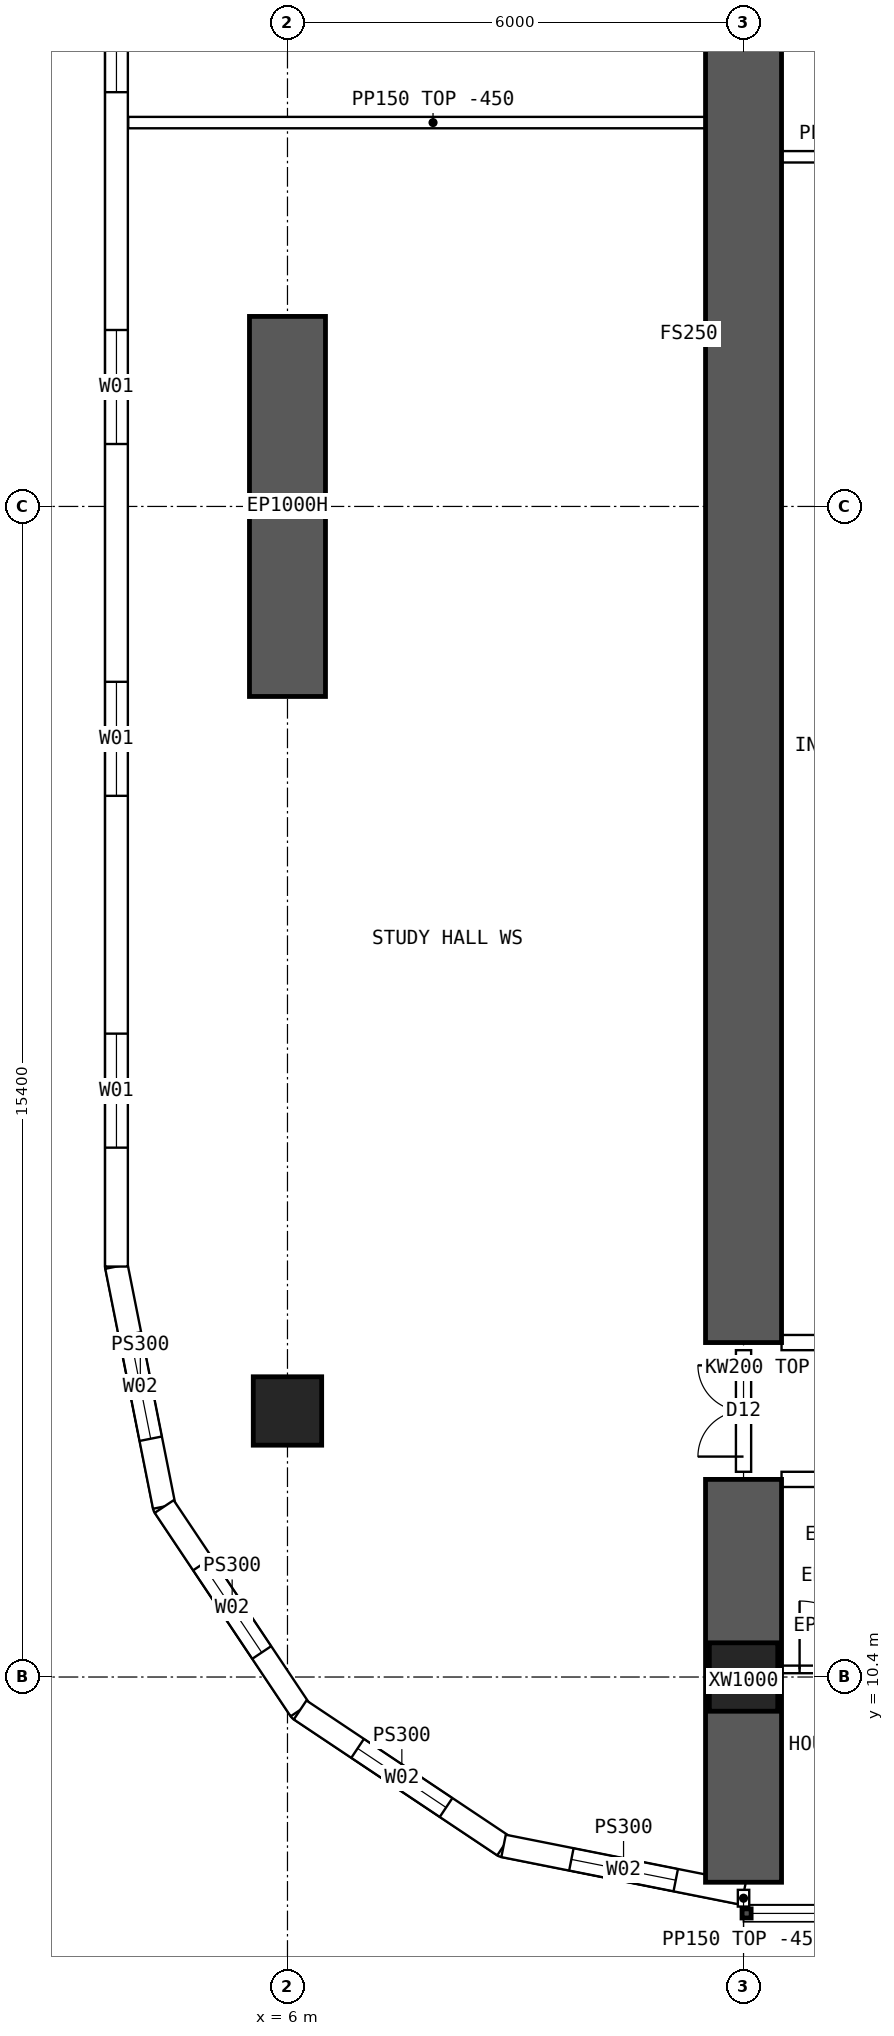
"""IFC4 building model, lengths in metres.
Left out: names, types, materials, properties, quantities, classifications, styles, units other than length and angle.
Written with IfcOpenShell. Run it as: python <this file> out.ifc"""

import sys

from ifc_helpers import new_model, si_unit, direction, frame, frame_2d, origin, origin_2d, place, context, subcontext, project, spatial, polyline, rectangle, hollow_rectangle, outline, extrude, element, fill, save


model = new_model("IFC4")
c1 = context("Model", 3, precision=1e-05, world=origin(), true_north=direction((0.0, 1.0)))
c2 = subcontext(c1, "Body", "Model", "MODEL_VIEW")
j1 = project(units=[si_unit("LENGTHUNIT", "METRE"), si_unit("PLANEANGLEUNIT", "RADIAN")], contexts=[c1])
p1 = place(None, origin())
s1 = spatial("IfcSite", under=j1, at=p1, CompositionType="ELEMENT")
p2 = place(p1, origin())
s2 = spatial("IfcBuilding", under=s1, at=p2, CompositionType="ELEMENT")
p3 = place(p2, frame((0.0, 0.0, 20.2)))
s3 = spatial("IfcBuildingStorey", under=s2, at=p3, CompositionType="ELEMENT", Elevation=20.2)
for number, where, z_axis, x_axis in (
    (1, (12.0, 10.4, 0.0), (0.0, 0.0, 1.0), (1.0, 0.0, 0.0)),
    (2, (6.0, 13.9, 0.0), (0.0, 0.0, 1.0), (1.0, 0.0, 0.0)),
):
    element("IfcColumn", number, at=place(p3, frame(where, z_axis=z_axis, x_axis=x_axis)), inside=s3, PredefinedType="COLUMN", context=c2, shape_type="SweptSolid", body=[
        extrude(hollow_rectangle(XDim=0.9, YDim=0.9, WallThickness=0.09, at=origin_2d()), origin(), (0.0, 0.0, 1.0), 3.75),
    ])
p4 = place(p3, frame((6.0, 23.3, 0.0), z_axis=(0.0, 0.0, 1.0), x_axis=(0.0, 1.0, 0.0)))
e3 = element("IfcWall", 3, at=p4, inside=s3, PredefinedType="SHEAR", context=c2, shape_type="SweptSolid", body=[
    extrude(rectangle(XDim=5.0, YDim=1.0, at=frame_2d((2.5, 0.0))), origin(), (0.0, 0.0, 1.0), 3.75),
])
p5 = place(p3, frame((12.0, 7.7, 0.0), z_axis=(0.0, 0.0, 1.0), x_axis=(0.0, 1.0, 0.0)))
e4 = element("IfcWall", 4, at=p5, inside=s3, PredefinedType="SHEAR", context=c2, shape_type="SweptSolid", body=[
    extrude(rectangle(XDim=5.3, YDim=1.0, at=frame_2d((2.65, 0.0))), origin(), (0.0, 0.0, 1.0), 3.75),
])
p6 = place(p3, frame((12.0, 14.8, 0.0), z_axis=(0.0, 0.0, 1.0), x_axis=(0.0, 1.0, 0.0)))
e5 = element("IfcWall", 5, at=p6, inside=s3, PredefinedType="SHEAR", context=c2, shape_type="SweptSolid", body=[
    extrude(rectangle(XDim=34.4, YDim=1.0, at=frame_2d((17.2, 0.0))), origin(), (0.0, 0.0, 1.0), 3.75),
])
p7 = place(p3, frame((3.75, 48.2, 0.0), z_axis=(0.0, 0.0, 1.0), x_axis=(0.0, -1.0, 0.0)))
e6 = element("IfcWall", 6, at=p7, inside=s3, PredefinedType="SOLIDWALL", context=c2, shape_type="SweptSolid", body=[
    extrude(outline(polyline([(-0.015, -0.15), (32.415, -0.15), (32.385, 0.15), (0.015, 0.15), (-0.015, -0.15)])), origin(), (0.0, 0.0, 1.0), 3.3),
])
p8 = place(p7, frame((1.564, 0.0, 0.9)))
e7 = element("IfcOpeningElement", 7, at=p8, cuts=e6, PredefinedType="OPENING", context=c2, shape_type="SweptSolid", body=[
    extrude(rectangle(XDim=1.5, YDim=2.0, at=frame_2d((0.75, 1.0))), frame((0.0, 0.16, 0.0), z_axis=(0.0, -1.0, 0.0), x_axis=(1.0, 0.0, 0.0)), (0.0, 0.0, 1.0), 0.32),
])
p9 = place(p7, frame((6.193, 0.0, 0.9)))
e8 = element("IfcOpeningElement", 8, at=p9, cuts=e6, PredefinedType="OPENING", context=c2, shape_type="SweptSolid", body=[
    extrude(rectangle(XDim=1.5, YDim=2.0, at=frame_2d((0.75, 1.0))), frame((0.0, 0.16, 0.0), z_axis=(0.0, -1.0, 0.0), x_axis=(1.0, 0.0, 0.0)), (0.0, 0.0, 1.0), 0.32),
])
p10 = place(p7, frame((10.822, 0.0, 0.9)))
e9 = element("IfcOpeningElement", 9, at=p10, cuts=e6, PredefinedType="OPENING", context=c2, shape_type="SweptSolid", body=[
    extrude(rectangle(XDim=1.5, YDim=2.0, at=frame_2d((0.75, 1.0))), frame((0.0, 0.16, 0.0), z_axis=(0.0, -1.0, 0.0), x_axis=(1.0, 0.0, 0.0)), (0.0, 0.0, 1.0), 0.32),
])
p11 = place(p7, frame((15.45, 0.0, 0.9)))
e10 = element("IfcOpeningElement", 10, at=p11, cuts=e6, PredefinedType="OPENING", context=c2, shape_type="SweptSolid", body=[
    extrude(rectangle(XDim=1.5, YDim=2.0, at=frame_2d((0.75, 1.0))), frame((0.0, 0.16, 0.0), z_axis=(0.0, -1.0, 0.0), x_axis=(1.0, 0.0, 0.0)), (0.0, 0.0, 1.0), 0.32),
])
p12 = place(p7, frame((20.079, 0.0, 0.9)))
e11 = element("IfcOpeningElement", 11, at=p12, cuts=e6, PredefinedType="OPENING", context=c2, shape_type="SweptSolid", body=[
    extrude(rectangle(XDim=1.5, YDim=2.0, at=frame_2d((0.75, 1.0))), frame((0.0, 0.16, 0.0), z_axis=(0.0, -1.0, 0.0), x_axis=(1.0, 0.0, 0.0)), (0.0, 0.0, 1.0), 0.32),
])
p13 = place(p7, frame((24.707, 0.0, 0.9)))
e12 = element("IfcOpeningElement", 12, at=p13, cuts=e6, PredefinedType="OPENING", context=c2, shape_type="SweptSolid", body=[
    extrude(rectangle(XDim=1.5, YDim=2.0, at=frame_2d((0.75, 1.0))), frame((0.0, 0.16, 0.0), z_axis=(0.0, -1.0, 0.0), x_axis=(1.0, 0.0, 0.0)), (0.0, 0.0, 1.0), 0.32),
])
p14 = place(p7, frame((29.336, 0.0, 0.9)))
e13 = element("IfcOpeningElement", 13, at=p14, cuts=e6, PredefinedType="OPENING", context=c2, shape_type="SweptSolid", body=[
    extrude(rectangle(XDim=1.5, YDim=2.0, at=frame_2d((0.75, 1.0))), frame((0.0, 0.16, 0.0), z_axis=(0.0, -1.0, 0.0), x_axis=(1.0, 0.0, 0.0)), (0.0, 0.0, 1.0), 0.32),
])
p15 = place(p3, frame((3.75, 15.8, 0.0), z_axis=(0.0, 0.0, 1.0), x_axis=(0.195065901187, -0.980790137692, 0.0)))
e14 = element("IfcWall", 14, at=p15, inside=s3, PredefinedType="SOLIDWALL", context=c2, shape_type="SweptSolid", body=[
    extrude(outline(polyline([(-0.015, -0.15), (3.249, -0.15), (3.189, 0.15), (0.015, 0.15), (-0.015, -0.15)])), origin(), (0.0, 0.0, 1.0), 3.3),
])
p16 = place(p15, frame((0.909, 0.0, 0.9)))
e15 = element("IfcOpeningElement", 15, at=p16, cuts=e14, PredefinedType="OPENING", context=c2, shape_type="SweptSolid", body=[
    extrude(rectangle(XDim=1.4, YDim=1.8, at=frame_2d((0.7, 0.9))), frame((0.0, 0.16, 0.0), z_axis=(0.0, -1.0, 0.0), x_axis=(1.0, 0.0, 0.0)), (0.0, 0.0, 1.0), 0.32),
])
p17 = place(p3, frame((4.378, 12.643, 0.0), z_axis=(0.0, 0.0, 1.0), x_axis=(0.555609954424, -0.831443069936, 0.0)))
e16 = element("IfcWall", 16, at=p17, inside=s3, PredefinedType="SOLIDWALL", context=c2, shape_type="SweptSolid", body=[
    extrude(outline(polyline([(-0.03, -0.15), (3.249, -0.15), (3.189, 0.15), (0.03, 0.15), (-0.03, -0.15)])), origin(), (0.0, 0.0, 1.0), 3.3),
])
p18 = place(p17, frame((0.909, 0.0, 0.9)))
e17 = element("IfcOpeningElement", 17, at=p18, cuts=e16, PredefinedType="OPENING", context=c2, shape_type="SweptSolid", body=[
    extrude(rectangle(XDim=1.4, YDim=1.8, at=frame_2d((0.7, 0.9))), frame((0.0, 0.16, 0.0), z_axis=(0.0, -1.0, 0.0), x_axis=(1.0, 0.0, 0.0)), (0.0, 0.0, 1.0), 0.32),
])
p19 = place(p3, frame((6.167, 9.966, 0.0), z_axis=(0.0, 0.0, 1.0), x_axis=(0.831478105043, -0.555557522525, 0.0)))
e18 = element("IfcWall", 18, at=p19, inside=s3, PredefinedType="SOLIDWALL", context=c2, shape_type="SweptSolid", body=[
    extrude(outline(polyline([(-0.03, -0.15), (3.249, -0.15), (3.189, 0.15), (0.03, 0.15), (-0.03, -0.15)])), origin(), (0.0, 0.0, 1.0), 3.3),
])
p20 = place(p19, frame((0.909, 0.0, 0.9)))
e19 = element("IfcOpeningElement", 19, at=p20, cuts=e18, PredefinedType="OPENING", context=c2, shape_type="SweptSolid", body=[
    extrude(rectangle(XDim=1.4, YDim=1.8, at=frame_2d((0.7, 0.9))), frame((0.0, 0.16, 0.0), z_axis=(0.0, -1.0, 0.0), x_axis=(1.0, 0.0, 0.0)), (0.0, 0.0, 1.0), 0.32),
])
p21 = place(p3, frame((8.843, 8.178, 0.0), z_axis=(0.0, 0.0, 1.0), x_axis=(0.980787251524, -0.195080412259, 0.0)))
e20 = element("IfcWall", 20, at=p21, inside=s3, PredefinedType="SOLIDWALL", context=c2, shape_type="SweptSolid", body=[
    extrude(outline(polyline([(-0.03, -0.15), (3.249, -0.15), (3.189, 0.15), (0.03, 0.15), (-0.03, -0.15)])), origin(), (0.0, 0.0, 1.0), 3.3),
])
p22 = place(p21, frame((0.909, 0.0, 0.9)))
e21 = element("IfcOpeningElement", 21, at=p22, cuts=e20, PredefinedType="OPENING", context=c2, shape_type="SweptSolid", body=[
    extrude(rectangle(XDim=1.4, YDim=1.8, at=frame_2d((0.7, 0.9))), frame((0.0, 0.16, 0.0), z_axis=(0.0, -1.0, 0.0), x_axis=(1.0, 0.0, 0.0)), (0.0, 0.0, 1.0), 0.32),
])
p23 = place(p3, frame((12.5, 13.0, 0.0), z_axis=(0.0, 0.0, 1.0), x_axis=(1.0, 0.0, 0.0)))
e22 = element("IfcWall", 22, at=p23, inside=s3, PredefinedType="SOLIDWALL", context=c2, shape_type="SweptSolid", body=[
    extrude(outline(polyline([(0.0, 0.0), (5.0, 0.0), (5.0, 2.9), (0.0, 2.9), (0.0, 0.0)])), frame((0.0, 0.1, 0.0), z_axis=(0.0, -1.0, 0.0), x_axis=(1.0, 0.0, 0.0)), (0.0, 0.0, 1.0), 0.2),
])
p24 = place(p23, frame((1.425, 0.0, 0.0)))
e23 = element("IfcOpeningElement", 23, at=p24, cuts=e22, PredefinedType="OPENING", context=c2, shape_type="SweptSolid", body=[
    extrude(rectangle(XDim=0.9, YDim=2.1, at=frame_2d((0.45, 1.05))), frame((0.0, 0.11, 0.0), z_axis=(0.0, -1.0, 0.0), x_axis=(1.0, 0.0, 0.0)), (0.0, 0.0, 1.0), 0.22),
])
p25 = place(p23, frame((2.675, 0.0, 0.0)))
e24 = element("IfcOpeningElement", 24, at=p25, cuts=e22, PredefinedType="OPENING", context=c2, shape_type="SweptSolid", body=[
    extrude(rectangle(XDim=0.9, YDim=2.1, at=frame_2d((0.45, 1.05))), frame((0.0, 0.11, 0.0), z_axis=(0.0, -1.0, 0.0), x_axis=(1.0, 0.0, 0.0)), (0.0, 0.0, 1.0), 0.22),
])
p26 = place(p3, frame((12.5, 14.8, 0.0), z_axis=(0.0, 0.0, 1.0), x_axis=(1.0, 0.0, 0.0)))
e25 = element("IfcWall", 25, at=p26, inside=s3, PredefinedType="SOLIDWALL", context=c2, shape_type="SweptSolid", body=[
    extrude(rectangle(XDim=5.0, YDim=0.2, at=frame_2d((2.5, 0.0))), origin(), (0.0, 0.0, 1.0), 3.3),
])
p27 = place(p26, frame((3.3, 0.0, 0.0)))
e26 = element("IfcOpeningElement", 26, at=p27, cuts=e25, PredefinedType="OPENING", context=c2, shape_type="SweptSolid", body=[
    extrude(rectangle(XDim=1.6, YDim=2.1, at=frame_2d((0.8, 1.05))), frame((0.0, 0.11, 0.0), z_axis=(0.0, -1.0, 0.0), x_axis=(1.0, 0.0, 0.0)), (0.0, 0.0, 1.0), 0.22),
])
p28 = place(p3, frame((13.875, 10.5, 0.0), z_axis=(0.0, 0.0, 1.0), x_axis=(-1.0, 0.0, 0.0)))
e27 = element("IfcWall", 27, at=p28, inside=s3, PredefinedType="PARTITIONING", context=c2, shape_type="SweptSolid", body=[
    extrude(outline(polyline([(0.0, 0.0), (1.425, 0.0), (1.425, 2.9), (0.0, 2.9), (0.0, 0.0)])), frame((0.0, 0.05, 0.0), z_axis=(0.0, -1.0, 0.0), x_axis=(1.0, 0.0, 0.0)), (0.0, 0.0, 1.0), 0.1),
])
p29 = place(p28, frame((0.238, 0.0, 0.0)))
e28 = element("IfcOpeningElement", 28, at=p29, cuts=e27, PredefinedType="OPENING", context=c2, shape_type="SweptSolid", body=[
    extrude(rectangle(XDim=0.9, YDim=2.1, at=frame_2d((0.45, 1.05))), frame((0.0, 0.06, 0.0), z_axis=(0.0, -1.0, 0.0), x_axis=(1.0, 0.0, 0.0)), (0.0, 0.0, 1.0), 0.12),
])
p30 = place(p3, frame((12.0, 30.4, 0.0), z_axis=(0.0, 0.0, 1.0), x_axis=(1.0, 0.0, 0.0)))
e29 = element("IfcWall", 29, at=p30, inside=s3, PredefinedType="PARTITIONING", context=c2, shape_type="SweptSolid", body=[
    extrude(rectangle(XDim=3.6, YDim=0.15, at=frame_2d((1.8, 0.0))), origin(), (0.0, 0.0, 1.0), 3.3),
])
p31 = place(p3, frame((3.905, 30.85, 0.0), z_axis=(0.0, 0.0, 1.0), x_axis=(1.0, 0.0, 0.0)))
e30 = element("IfcWall", 30, at=p31, inside=s3, PredefinedType="PARTITIONING", context=c2, shape_type="SweptSolid", body=[
    extrude(outline(polyline([(0.0, 0.0), (8.02, 0.0), (8.02, 3.3), (2.397, 3.3), (2.395, 2.85), (1.797, 2.85), (1.795, 3.3), (0.0, 3.3), (0.0, 0.0)])), frame((0.0, 0.075, 0.0), z_axis=(0.0, -1.0, 0.0), x_axis=(1.0, 0.0, 0.0)), (0.0, 0.0, 1.0), 0.15),
])
p32 = place(p3, frame((12.0, 13.1, 0.0), z_axis=(0.0, 0.0, 1.0), x_axis=(0.0, 1.0, 0.0)))
e31 = element("IfcWall", 31, at=p32, inside=s3, PredefinedType="SOLIDWALL", context=c2, shape_type="SweptSolid", body=[
    extrude(outline(polyline([(0.0, 0.0), (1.6, 0.0), (1.6, 2.85), (0.0, 2.85), (0.0, 0.0)])), frame((0.0, 0.1, 0.0), z_axis=(0.0, -1.0, 0.0), x_axis=(1.0, 0.0, 0.0)), (0.0, 0.0, 1.0), 0.2),
])
p33 = place(p32, frame((0.2, 0.0, 0.0)))
e32 = element("IfcOpeningElement", 32, at=p33, cuts=e31, PredefinedType="OPENING", context=c2, shape_type="SweptSolid", body=[
    extrude(rectangle(XDim=1.2, YDim=2.1, at=frame_2d((0.6, 1.05))), frame((0.0, 0.11, 0.0), z_axis=(0.0, -1.0, 0.0), x_axis=(1.0, 0.0, 0.0)), (0.0, 0.0, 1.0), 0.22),
])
p34 = place(p3, frame((12.0, 7.6, 0.0), z_axis=(0.0, 0.0, 1.0), x_axis=(0.0, -1.0, 0.0)))
e33 = element("IfcWall", 33, at=p34, inside=s3, PredefinedType="PARTITIONING", context=c2, shape_type="SweptSolid", body=[
    extrude(rectangle(XDim=0.22, YDim=0.15, at=frame_2d((0.11, 0.0))), origin(), (0.0, 0.0, 1.0), 3.3),
])
p35 = place(p11, origin())
e34 = element("IfcWindow", 34, at=p35, inside=s3, PartitioningType="SINGLE_PANEL", PredefinedType="WINDOW", context=c2, shape_type="SweptSolid", body=[
    extrude(rectangle(XDim=1.5, YDim=2.0, at=frame_2d((0.75, 1.0))), frame((0.0, 0.03, 0.0), z_axis=(0.0, -1.0, 0.0), x_axis=(1.0, 0.0, 0.0)), (0.0, 0.0, 1.0), 0.06),
])
fill(e10, e34)
p36 = place(p12, origin())
e35 = element("IfcWindow", 35, at=p36, inside=s3, PartitioningType="SINGLE_PANEL", PredefinedType="WINDOW", context=c2, shape_type="SweptSolid", body=[
    extrude(rectangle(XDim=1.5, YDim=2.0, at=frame_2d((0.75, 1.0))), frame((0.0, 0.03, 0.0), z_axis=(0.0, -1.0, 0.0), x_axis=(1.0, 0.0, 0.0)), (0.0, 0.0, 1.0), 0.06),
])
fill(e11, e35)
p37 = place(p13, origin())
e36 = element("IfcWindow", 36, at=p37, inside=s3, PartitioningType="SINGLE_PANEL", PredefinedType="WINDOW", context=c2, shape_type="SweptSolid", body=[
    extrude(rectangle(XDim=1.5, YDim=2.0, at=frame_2d((0.75, 1.0))), frame((0.0, 0.03, 0.0), z_axis=(0.0, -1.0, 0.0), x_axis=(1.0, 0.0, 0.0)), (0.0, 0.0, 1.0), 0.06),
])
fill(e12, e36)
p38 = place(p14, origin())
e37 = element("IfcWindow", 37, at=p38, inside=s3, PartitioningType="SINGLE_PANEL", PredefinedType="WINDOW", context=c2, shape_type="SweptSolid", body=[
    extrude(rectangle(XDim=1.5, YDim=2.0, at=frame_2d((0.75, 1.0))), frame((0.0, 0.03, 0.0), z_axis=(0.0, -1.0, 0.0), x_axis=(1.0, 0.0, 0.0)), (0.0, 0.0, 1.0), 0.06),
])
fill(e13, e37)
p39 = place(p16, origin())
e38 = element("IfcWindow", 38, at=p39, inside=s3, PartitioningType="SINGLE_PANEL", PredefinedType="WINDOW", context=c2, shape_type="SweptSolid", body=[
    extrude(rectangle(XDim=1.4, YDim=1.8, at=frame_2d((0.7, 0.9))), frame((0.0, 0.03, 0.0), z_axis=(0.0, -1.0, 0.0), x_axis=(1.0, 0.0, 0.0)), (0.0, 0.0, 1.0), 0.06),
])
fill(e15, e38)
p40 = place(p18, origin())
e39 = element("IfcWindow", 39, at=p40, inside=s3, PartitioningType="SINGLE_PANEL", PredefinedType="WINDOW", context=c2, shape_type="SweptSolid", body=[
    extrude(rectangle(XDim=1.4, YDim=1.8, at=frame_2d((0.7, 0.9))), frame((0.0, 0.03, 0.0), z_axis=(0.0, -1.0, 0.0), x_axis=(1.0, 0.0, 0.0)), (0.0, 0.0, 1.0), 0.06),
])
fill(e17, e39)
p41 = place(p20, origin())
e40 = element("IfcWindow", 40, at=p41, inside=s3, PartitioningType="SINGLE_PANEL", PredefinedType="WINDOW", context=c2, shape_type="SweptSolid", body=[
    extrude(rectangle(XDim=1.4, YDim=1.8, at=frame_2d((0.7, 0.9))), frame((0.0, 0.03, 0.0), z_axis=(0.0, -1.0, 0.0), x_axis=(1.0, 0.0, 0.0)), (0.0, 0.0, 1.0), 0.06),
])
fill(e19, e40)
p42 = place(p22, origin())
e41 = element("IfcWindow", 41, at=p42, inside=s3, PartitioningType="SINGLE_PANEL", PredefinedType="WINDOW", context=c2, shape_type="SweptSolid", body=[
    extrude(rectangle(XDim=1.4, YDim=1.8, at=frame_2d((0.7, 0.9))), frame((0.0, 0.03, 0.0), z_axis=(0.0, -1.0, 0.0), x_axis=(1.0, 0.0, 0.0)), (0.0, 0.0, 1.0), 0.06),
])
fill(e21, e41)
p43 = place(p29, origin())
e42 = element("IfcDoor", 42, at=p43, inside=s3, OperationType="SINGLE_SWING_RIGHT", PredefinedType="DOOR", context=c2, shape_type="SweptSolid", body=[
    extrude(rectangle(XDim=0.9, YDim=2.1, at=frame_2d((0.45, 1.05))), frame((0.0, 0.025, 0.0), z_axis=(0.0, -1.0, 0.0), x_axis=(1.0, 0.0, 0.0)), (0.0, 0.0, 1.0), 0.05),
])
fill(e28, e42)
p44 = place(p33, origin())
e43 = element("IfcDoor", 43, at=p44, inside=s3, OperationType="DOUBLE_DOOR_SINGLE_SWING", PredefinedType="DOOR", context=c2, shape_type="SweptSolid", body=[
    extrude(rectangle(XDim=1.2, YDim=2.1, at=frame_2d((0.6, 1.05))), frame((0.0, 0.025, 0.0), z_axis=(0.0, -1.0, 0.0), x_axis=(1.0, 0.0, 0.0)), (0.0, 0.0, 1.0), 0.05),
])
fill(e32, e43)
save(model, sys.argv[1])
